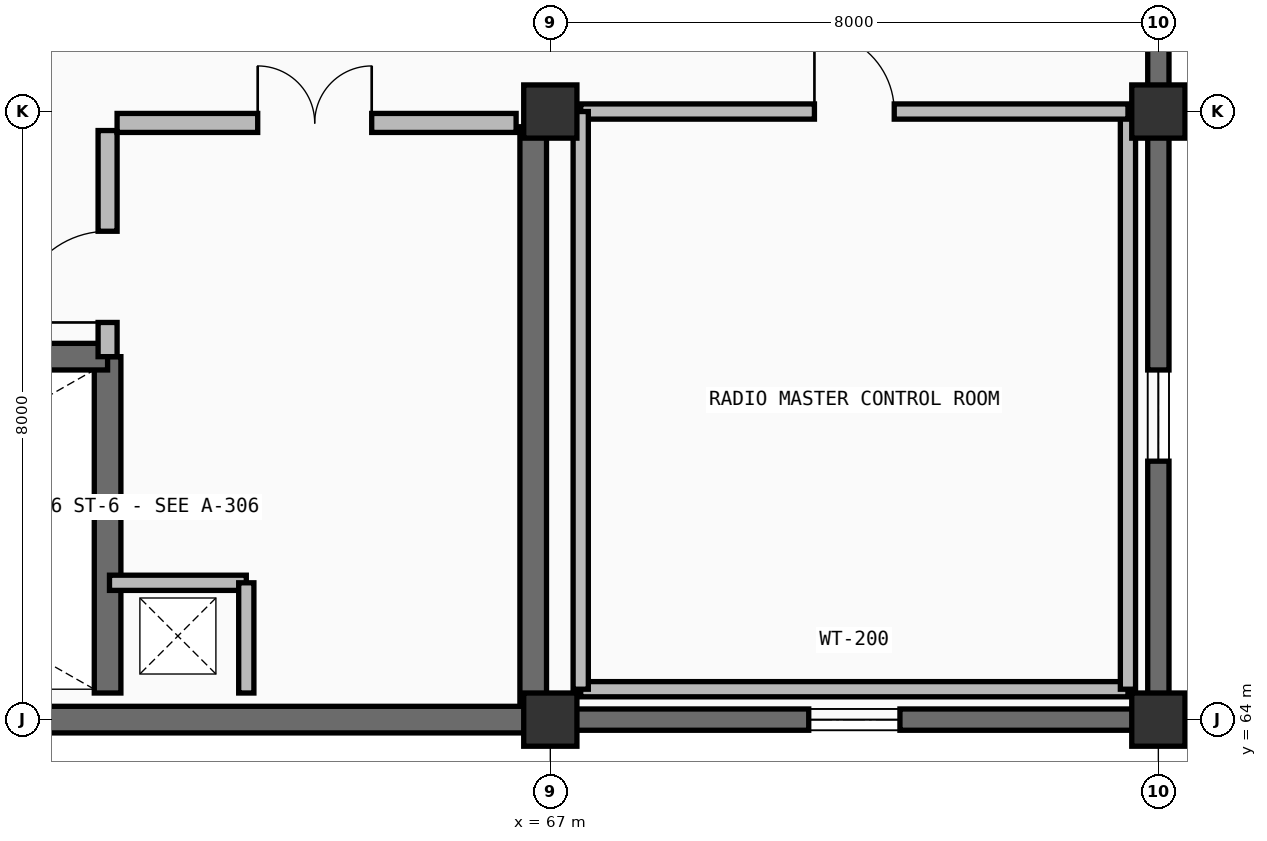
"""IFC4 building model, lengths in metres.
Left out: names, types, materials, properties, quantities, classifications, styles, units other than length and angle.
Written with IfcOpenShell. Run it as: python <this file> out.ifc"""

import sys

from ifc_helpers import new_model, si_unit, direction, frame, frame_2d, origin, origin_2d, place, context, subcontext, project, spatial, rectangle, extrude, element, fill, save


model = new_model("IFC4")
c1 = context("Model", 3, precision=1e-05, world=origin(), true_north=direction((0.0, 1.0)))
c2 = subcontext(c1, "Body", "Model", "MODEL_VIEW")
j1 = project(units=[si_unit("LENGTHUNIT", "METRE"), si_unit("PLANEANGLEUNIT", "RADIAN")], contexts=[c1])
p1 = place(None, origin())
s1 = spatial("IfcSite", under=j1, at=p1, CompositionType="ELEMENT")
p2 = place(p1, origin())
s2 = spatial("IfcBuilding", under=s1, at=p2, CompositionType="ELEMENT")
p3 = place(p2, frame((0.0, 0.0, 14.4)))
s3 = spatial("IfcBuildingStorey", under=s2, at=p3, CompositionType="ELEMENT", Elevation=14.4)
for number, where, z_axis, x_axis in (
    (1, (67.0, 64.0, 0.0), (0.0, 0.0, 1.0), (1.0, 0.0, 0.0)),
    (2, (67.0, 72.0, 0.0), (0.0, 0.0, 1.0), (1.0, 0.0, 0.0)),
    (3, (75.0, 64.0, 0.0), (0.0, 0.0, 1.0), (1.0, 0.0, 0.0)),
    (4, (75.0, 72.0, 0.0), (0.0, 0.0, 1.0), (1.0, 0.0, 0.0)),
):
    element("IfcColumn", number, at=place(p3, frame(where, z_axis=z_axis, x_axis=x_axis)), inside=s3, PredefinedType="COLUMN", context=c2, shape_type="SweptSolid", body=[
        extrude(rectangle(XDim=0.7, YDim=0.7, at=origin_2d()), origin(), (0.0, 0.0, 1.0), 4.5),
    ])
p4 = place(p3, frame((75.0, 80.0, 0.0), z_axis=(0.0, 0.0, 1.0), x_axis=(0.0, -1.0, 0.0)))
e5 = element("IfcWall", 5, at=p4, inside=s3, PredefinedType="SOLIDWALL", context=c2, shape_type="SweptSolid", body=[
    extrude(rectangle(XDim=8.0, YDim=0.28, at=frame_2d((4.0, 0.0))), origin(), (0.0, 0.0, 1.0), 4.5),
])
p5 = place(p4, frame((3.4, 0.0, 0.85)))
e6 = element("IfcOpeningElement", 6, at=p5, cuts=e5, PredefinedType="OPENING", context=c2, shape_type="SweptSolid", body=[
    extrude(rectangle(XDim=1.2, YDim=2.2, at=frame_2d((0.6, 1.1))), frame((0.0, 0.15, 0.0), z_axis=(0.0, -1.0, 0.0), x_axis=(1.0, 0.0, 0.0)), (0.0, 0.0, 1.0), 0.3),
])
p6 = place(p3, frame((75.0, 72.0, 0.0), z_axis=(0.0, 0.0, 1.0), x_axis=(0.0, -1.0, 0.0)))
e7 = element("IfcWall", 7, at=p6, inside=s3, PredefinedType="SOLIDWALL", context=c2, shape_type="SweptSolid", body=[
    extrude(rectangle(XDim=8.0, YDim=0.28, at=frame_2d((4.0, 0.0))), origin(), (0.0, 0.0, 1.0), 4.5),
])
p7 = place(p6, frame((3.4, 0.0, 0.85)))
e8 = element("IfcOpeningElement", 8, at=p7, cuts=e7, PredefinedType="OPENING", context=c2, shape_type="SweptSolid", body=[
    extrude(rectangle(XDim=1.2, YDim=2.2, at=frame_2d((0.6, 1.1))), frame((0.0, 0.15, 0.0), z_axis=(0.0, -1.0, 0.0), x_axis=(1.0, 0.0, 0.0)), (0.0, 0.0, 1.0), 0.3),
])
p8 = place(p3, frame((75.0, 64.0, 0.0), z_axis=(0.0, 0.0, 1.0), x_axis=(-1.0, 0.0, 0.0)))
e9 = element("IfcWall", 9, at=p8, inside=s3, PredefinedType="SOLIDWALL", context=c2, shape_type="SweptSolid", body=[
    extrude(rectangle(XDim=8.0, YDim=0.28, at=frame_2d((4.0, 0.0))), origin(), (0.0, 0.0, 1.0), 4.5),
])
p9 = place(p8, frame((3.4, 0.0, 0.85)))
e10 = element("IfcOpeningElement", 10, at=p9, cuts=e9, PredefinedType="OPENING", context=c2, shape_type="SweptSolid", body=[
    extrude(rectangle(XDim=1.2, YDim=2.2, at=frame_2d((0.6, 1.1))), frame((0.0, 0.15, 0.0), z_axis=(0.0, -1.0, 0.0), x_axis=(1.0, 0.0, 0.0)), (0.0, 0.0, 1.0), 0.3),
])
p10 = place(p3, frame((67.0, 64.0, 0.0), z_axis=(0.0, 0.0, 1.0), x_axis=(-1.0, 0.0, 0.0)))
e11 = element("IfcWall", 11, at=p10, inside=s3, PredefinedType="SHEAR", context=c2, shape_type="SweptSolid", body=[
    extrude(rectangle(XDim=8.0, YDim=0.35, at=frame_2d((4.0, 0.0))), origin(), (0.0, 0.0, 1.0), 4.5),
])
p11 = place(p3, frame((61.175, 64.35, 0.0), z_axis=(0.0, 0.0, 1.0), x_axis=(0.0, 1.0, 0.0)))
e12 = element("IfcWall", 12, at=p11, inside=s3, PredefinedType="SHEAR", context=c2, shape_type="SweptSolid", body=[
    extrude(rectangle(XDim=4.425, YDim=0.35, at=frame_2d((2.212, 0.0))), origin(), (0.0, 0.0, 1.0), 4.2),
])
p12 = place(p3, frame((66.775, 64.2, 0.0), z_axis=(0.0, 0.0, 1.0), x_axis=(0.0, 1.0, 0.0)))
e13 = element("IfcWall", 13, at=p12, inside=s3, PredefinedType="SHEAR", context=c2, shape_type="SweptSolid", body=[
    extrude(rectangle(XDim=7.6, YDim=0.35, at=frame_2d((3.8, 0.0))), origin(), (0.0, 0.0, 1.0), 4.2),
])
p13 = place(p3, frame((61.2, 65.8, 0.0), z_axis=(0.0, 0.0, 1.0), x_axis=(1.0, 0.0, 0.0)))
e14 = element("IfcWall", 14, at=p13, inside=s3, PredefinedType="PARTITIONING", context=c2, shape_type="SweptSolid", body=[
    extrude(rectangle(XDim=1.8, YDim=0.2, at=frame_2d((0.9, 0.0))), origin(), (0.0, 0.0, 1.0), 4.2),
])
p14 = place(p3, frame((63.0, 64.35, 0.0), z_axis=(0.0, 0.0, 1.0), x_axis=(0.0, 1.0, 0.0)))
e15 = element("IfcWall", 15, at=p14, inside=s3, PredefinedType="PARTITIONING", context=c2, shape_type="SweptSolid", body=[
    extrude(rectangle(XDim=1.45, YDim=0.2, at=frame_2d((0.725, 0.0))), origin(), (0.0, 0.0, 1.0), 4.2),
])
p15 = place(p3, frame((51.35, 68.775, 0.0), z_axis=(0.0, 0.0, 1.0), x_axis=(1.0, 0.0, 0.0)))
e16 = element("IfcWall", 16, at=p15, inside=s3, PredefinedType="SHEAR", context=c2, shape_type="SweptSolid", body=[
    extrude(rectangle(XDim=9.825, YDim=0.35, at=frame_2d((4.913, 0.0))), origin(), (0.0, 0.0, 1.0), 4.2),
])
p16 = place(p15, frame((0.4, 0.0, 0.0)))
e17 = element("IfcOpeningElement", 17, at=p16, cuts=e16, PredefinedType="OPENING", context=c2, shape_type="SweptSolid", body=[
    extrude(rectangle(XDim=1.85, YDim=2.25, at=frame_2d((0.925, 1.125))), frame((0.0, 0.185, 0.0), z_axis=(0.0, -1.0, 0.0), x_axis=(1.0, 0.0, 0.0)), (0.0, 0.0, 1.0), 0.37),
])
p17 = place(p3, frame((61.175, 68.775, 0.0), z_axis=(0.0, 0.0, 1.0), x_axis=(0.0, 1.0, 0.0)))
e18 = element("IfcWall", 18, at=p17, inside=s3, PredefinedType="PARTITIONING", context=c2, shape_type="SweptSolid", body=[
    extrude(rectangle(XDim=2.975, YDim=0.25, at=frame_2d((1.488, 0.0))), origin(), (0.0, 0.0, 1.0), 4.2),
])
p18 = place(p17, frame((0.45, 0.0, 0.0)))
e19 = element("IfcOpeningElement", 19, at=p18, cuts=e18, PredefinedType="OPENING", context=c2, shape_type="SweptSolid", body=[
    extrude(rectangle(XDim=1.2, YDim=2.2, at=frame_2d((0.6, 1.1))), frame((0.0, 0.135, 0.0), z_axis=(0.0, -1.0, 0.0), x_axis=(1.0, 0.0, 0.0)), (0.0, 0.0, 1.0), 0.27),
])
p19 = place(p3, frame((61.3, 71.85, 0.0), z_axis=(0.0, 0.0, 1.0), x_axis=(1.0, 0.0, 0.0)))
e20 = element("IfcWall", 20, at=p19, inside=s3, PredefinedType="PARTITIONING", context=c2, shape_type="SweptSolid", body=[
    extrude(rectangle(XDim=5.25, YDim=0.25, at=frame_2d((2.625, 0.0))), origin(), (0.0, 0.0, 1.0), 4.2),
])
p20 = place(p19, frame((1.85, 0.0, 0.0)))
e21 = element("IfcOpeningElement", 21, at=p20, cuts=e20, PredefinedType="OPENING", context=c2, shape_type="SweptSolid", body=[
    extrude(rectangle(XDim=1.5, YDim=2.2, at=frame_2d((0.75, 1.1))), frame((0.0, 0.135, 0.0), z_axis=(0.0, -1.0, 0.0), x_axis=(1.0, 0.0, 0.0)), (0.0, 0.0, 1.0), 0.27),
])
p21 = place(p3, frame((67.4, 64.4, 0.0), z_axis=(0.0, 0.0, 1.0), x_axis=(1.0, 0.0, 0.0)))
e22 = element("IfcWall", 22, at=p21, inside=s3, PredefinedType="PARTITIONING", context=c2, shape_type="SweptSolid", body=[
    extrude(rectangle(XDim=7.2, YDim=0.2, at=frame_2d((3.6, 0.0))), origin(), (0.0, 0.0, 1.0), 4.2),
])
p22 = place(p3, frame((74.6, 64.4, 0.0), z_axis=(0.0, 0.0, 1.0), x_axis=(0.0, 1.0, 0.0)))
e23 = element("IfcWall", 23, at=p22, inside=s3, PredefinedType="PARTITIONING", context=c2, shape_type="SweptSolid", body=[
    extrude(rectangle(XDim=7.6, YDim=0.2, at=frame_2d((3.8, 0.0))), origin(), (0.0, 0.0, 1.0), 4.2),
])
p23 = place(p3, frame((67.4, 72.0, 0.0), z_axis=(0.0, 0.0, 1.0), x_axis=(1.0, 0.0, 0.0)))
e24 = element("IfcWall", 24, at=p23, inside=s3, PredefinedType="PARTITIONING", context=c2, shape_type="SweptSolid", body=[
    extrude(rectangle(XDim=7.2, YDim=0.2, at=frame_2d((3.6, 0.0))), origin(), (0.0, 0.0, 1.0), 4.2),
])
p24 = place(p23, frame((3.075, 0.0, 0.0)))
e25 = element("IfcOpeningElement", 25, at=p24, cuts=e24, PredefinedType="OPENING", context=c2, shape_type="SweptSolid", body=[
    extrude(rectangle(XDim=1.05, YDim=2.16, at=frame_2d((0.525, 1.08))), frame((0.0, 0.11, 0.0), z_axis=(0.0, -1.0, 0.0), x_axis=(1.0, 0.0, 0.0)), (0.0, 0.0, 1.0), 0.22),
])
p25 = place(p3, frame((67.4, 64.4, 0.0), z_axis=(0.0, 0.0, 1.0), x_axis=(0.0, 1.0, 0.0)))
e26 = element("IfcWall", 26, at=p25, inside=s3, PredefinedType="PARTITIONING", context=c2, shape_type="SweptSolid", body=[
    extrude(rectangle(XDim=7.6, YDim=0.2, at=frame_2d((3.8, 0.0))), origin(), (0.0, 0.0, 1.0), 4.2),
])
p26 = place(p7, origin())
e27 = element("IfcWindow", 27, at=p26, inside=s3, PartitioningType="SINGLE_PANEL", PredefinedType="WINDOW", context=c2, shape_type="SweptSolid", body=[
    extrude(rectangle(XDim=1.2, YDim=2.2, at=frame_2d((0.6, 1.1))), frame((0.0, 0.03, 0.0), z_axis=(0.0, -1.0, 0.0), x_axis=(1.0, 0.0, 0.0)), (0.0, 0.0, 1.0), 0.06),
])
fill(e8, e27)
p27 = place(p9, origin())
e28 = element("IfcWindow", 28, at=p27, inside=s3, PartitioningType="SINGLE_PANEL", PredefinedType="WINDOW", context=c2, shape_type="SweptSolid", body=[
    extrude(rectangle(XDim=1.2, YDim=2.2, at=frame_2d((0.6, 1.1))), frame((0.0, 0.03, 0.0), z_axis=(0.0, -1.0, 0.0), x_axis=(1.0, 0.0, 0.0)), (0.0, 0.0, 1.0), 0.06),
])
fill(e10, e28)
p28 = place(p18, origin())
e29 = element("IfcDoor", 29, at=p28, inside=s3, OperationType="SINGLE_SWING_LEFT", PredefinedType="DOOR", context=c2, shape_type="SweptSolid", body=[
    extrude(rectangle(XDim=1.2, YDim=2.2, at=frame_2d((0.6, 1.1))), frame((0.0, 0.025, 0.0), z_axis=(0.0, -1.0, 0.0), x_axis=(1.0, 0.0, 0.0)), (0.0, 0.0, 1.0), 0.05),
])
fill(e19, e29)
p29 = place(p20, origin())
e30 = element("IfcDoor", 30, at=p29, inside=s3, OperationType="DOUBLE_DOOR_SINGLE_SWING", PredefinedType="DOOR", context=c2, shape_type="SweptSolid", body=[
    extrude(rectangle(XDim=1.5, YDim=2.2, at=frame_2d((0.75, 1.1))), frame((0.0, 0.025, 0.0), z_axis=(0.0, -1.0, 0.0), x_axis=(1.0, 0.0, 0.0)), (0.0, 0.0, 1.0), 0.05),
])
fill(e21, e30)
p30 = place(p24, origin())
e31 = element("IfcDoor", 31, at=p30, inside=s3, OperationType="SINGLE_SWING_LEFT", PredefinedType="DOOR", context=c2, shape_type="SweptSolid", body=[
    extrude(rectangle(XDim=1.05, YDim=2.16, at=frame_2d((0.525, 1.08))), frame((0.0, 0.025, 0.0), z_axis=(0.0, -1.0, 0.0), x_axis=(1.0, 0.0, 0.0)), (0.0, 0.0, 1.0), 0.05),
])
fill(e25, e31)
save(model, sys.argv[1])
